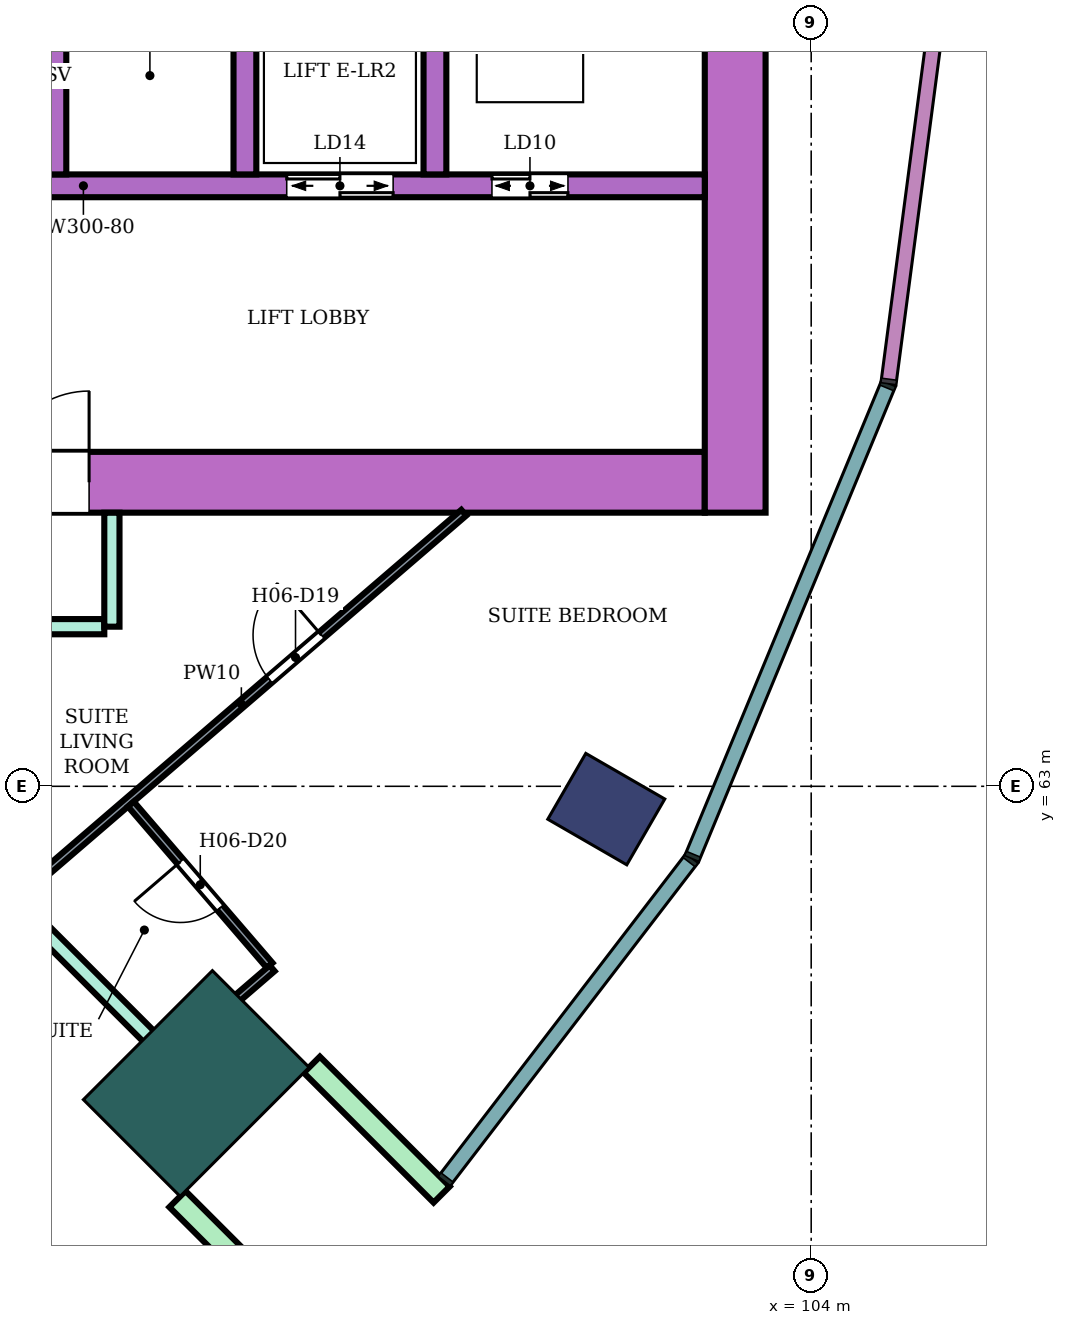
"""IFC4 building model, lengths in metres.
Left out: names, types, materials, properties, quantities, classifications, styles, units other than length and angle.
Written with IfcOpenShell. Run it as: python <this file> out.ifc"""

import sys

from ifc_helpers import new_model, si_unit, direction, frame, frame_2d, origin, origin_2d, place, context, subcontext, project, spatial, rectangle, extrude, element, fill, save


model = new_model("IFC4")
c1 = context("Model", 3, precision=1e-05, world=origin(), true_north=direction((0.0, 1.0)))
c2 = subcontext(c1, "Body", "Model", "MODEL_VIEW")
j1 = project(units=[si_unit("LENGTHUNIT", "METRE"), si_unit("PLANEANGLEUNIT", "RADIAN")], contexts=[c1])
p1 = place(None, origin())
s1 = spatial("IfcSite", under=j1, at=p1, CompositionType="ELEMENT")
p2 = place(p1, origin())
s2 = spatial("IfcBuilding", under=s1, at=p2, CompositionType="ELEMENT")
p3 = place(p2, frame((0.0, 0.0, 97.6)))
s3 = spatial("IfcBuildingStorey", under=s2, at=p3, CompositionType="ELEMENT", Elevation=97.6)
p4 = place(p3, frame((101.304, 62.7, 0.0), z_axis=(0.0, 0.0, 1.0), x_axis=(0.866025403784, -0.5, 0.0)))
e1 = element("IfcColumn", 1, at=p4, inside=s3, PredefinedType="COLUMN", context=c2, shape_type="SweptSolid", body=[
    extrude(rectangle(XDim=1.2, YDim=1.0, at=origin_2d()), origin(), (0.0, 0.0, 1.0), 3.8),
])
p5 = place(p3, frame((95.91, 59.09, 0.0), z_axis=(0.0, 0.0, 1.0), x_axis=(0.707106781187, -0.707106781187, 0.0)))
e2 = element("IfcColumn", 2, at=p5, inside=s3, PredefinedType="COLUMN", context=c2, shape_type="SweptSolid", body=[
    extrude(rectangle(XDim=1.8, YDim=2.4, at=origin_2d()), origin(), (0.0, 0.0, 1.0), 3.8),
])
p6 = place(p3, frame((87.9, 67.0, 0.0), z_axis=(0.0, 0.0, 1.0), x_axis=(1.0, 0.0, 0.0)))
e3 = element("IfcWall", 3, at=p6, inside=s3, PredefinedType="SHEAR", context=c2, shape_type="SweptSolid", body=[
    extrude(rectangle(XDim=14.7, YDim=0.8, at=frame_2d((7.35, 0.0))), origin(), (0.0, 0.0, 1.0), 3.48),
])
p7 = place(p6, frame((4.2, 0.0, 0.0)))
e4 = element("IfcOpeningElement", 4, at=p7, cuts=e3, PredefinedType="OPENING", context=c2, shape_type="SweptSolid", body=[
    extrude(rectangle(XDim=2.4, YDim=2.4, at=frame_2d((1.2, 1.2))), frame((0.0, 0.41, 0.0), z_axis=(0.0, -1.0, 0.0), x_axis=(1.0, 0.0, 0.0)), (0.0, 0.0, 1.0), 0.82),
])
p8 = place(p3, frame((103.0, 66.6, 0.0), z_axis=(0.0, 0.0, 1.0), x_axis=(0.0, 1.0, 0.0)))
e5 = element("IfcWall", 5, at=p8, inside=s3, PredefinedType="SHEAR", context=c2, shape_type="SweptSolid", body=[
    extrude(rectangle(XDim=16.8, YDim=0.8, at=frame_2d((8.4, 0.0))), origin(), (0.0, 0.0, 1.0), 3.48),
])
p9 = place(p3, frame((91.7, 70.9, 0.0), z_axis=(0.0, 0.0, 1.0), x_axis=(1.0, 0.0, 0.0)))
e6 = element("IfcWall", 6, at=p9, inside=s3, PredefinedType="SHEAR", context=c2, shape_type="SweptSolid", body=[
    extrude(rectangle(XDim=10.9, YDim=0.3, at=frame_2d((5.45, 0.0))), origin(), (0.0, 0.0, 1.0), 3.48),
])
p10 = place(p9, frame((0.4, 0.0, 0.0)))
e7 = element("IfcOpeningElement", 7, at=p10, cuts=e6, PredefinedType="OPENING", context=c2, shape_type="SweptSolid", body=[
    extrude(rectangle(XDim=1.4, YDim=2.1, at=frame_2d((0.7, 1.05))), frame((0.0, 0.16, 0.0), z_axis=(0.0, -1.0, 0.0), x_axis=(1.0, 0.0, 0.0)), (0.0, 0.0, 1.0), 0.32),
])
p11 = place(p9, frame((5.4, 0.0, 0.0)))
e8 = element("IfcOpeningElement", 8, at=p11, cuts=e6, PredefinedType="OPENING", context=c2, shape_type="SweptSolid", body=[
    extrude(rectangle(XDim=1.4, YDim=2.1, at=frame_2d((0.7, 1.05))), frame((0.0, 0.16, 0.0), z_axis=(0.0, -1.0, 0.0), x_axis=(1.0, 0.0, 0.0)), (0.0, 0.0, 1.0), 0.32),
])
p12 = place(p9, frame((8.1, 0.0, 0.0)))
e9 = element("IfcOpeningElement", 9, at=p12, cuts=e6, PredefinedType="OPENING", context=c2, shape_type="SweptSolid", body=[
    extrude(rectangle(XDim=1.0, YDim=2.1, at=frame_2d((0.5, 1.05))), frame((0.0, 0.16, 0.0), z_axis=(0.0, -1.0, 0.0), x_axis=(1.0, 0.0, 0.0)), (0.0, 0.0, 1.0), 0.32),
])
for number, where, z_axis, x_axis in (
    (10, (94.05, 71.05, 0.0), (0.0, 0.0, 1.0), (0.0, 1.0, 0.0)),
    (11, (96.55, 71.05, 0.0), (0.0, 0.0, 1.0), (0.0, 1.0, 0.0)),
    (12, (99.05, 71.05, 0.0), (0.0, 0.0, 1.0), (0.0, 1.0, 0.0)),
):
    element("IfcWall", number, at=place(p3, frame(where, z_axis=z_axis, x_axis=x_axis)), inside=s3, PredefinedType="SHEAR", context=c2, shape_type="SweptSolid", body=[
        extrude(rectangle(XDim=2.55, YDim=0.3, at=frame_2d((1.275, 0.0))), origin(), (0.0, 0.0, 1.0), 3.48),
    ])
for number, where, z_axis, x_axis in (
    (13, (95.662, 57.57, 0.0), (0.0, 0.0, 1.0), (0.707, -0.707, 0.0)),
    (14, (97.43, 59.338, 0.0), (0.0, 0.0, 1.0), (0.707, -0.707, 0.0)),
):
    element("IfcWall", number, at=place(p3, frame(where, z_axis=z_axis, x_axis=x_axis)), inside=s3, PredefinedType="NOTDEFINED", context=c2, shape_type="SweptSolid", body=[
        extrude(rectangle(XDim=2.416, YDim=0.3, at=frame_2d((1.208, 0.0))), origin(), (0.0, 0.0, 1.0), 3.8),
    ])
p13 = place(p3, frame((91.448, 63.547, 0.0), z_axis=(0.0, 0.0, 1.0), x_axis=(0.706949958062, -0.707263569538, 0.0)))
e15 = element("IfcWall", 15, at=p13, inside=s3, PredefinedType="PARTITIONING", context=c2, shape_type="SweptSolid", body=[
    extrude(rectangle(XDim=7.006, YDim=0.2, at=frame_2d((3.503, 0.0))), origin(), (0.0, 0.0, 1.0), 3.35),
])
p14 = place(p3, frame((93.085, 65.1, 0.0), z_axis=(0.0, 0.0, 1.0), x_axis=(1.0, 0.0, 0.0)))
e16 = element("IfcWall", 16, at=p14, inside=s3, PredefinedType="PARTITIONING", context=c2, shape_type="SweptSolid", body=[
    extrude(rectangle(XDim=1.615, YDim=0.2, at=frame_2d((0.808, 0.0))), origin(), (0.0, 0.0, 1.0), 3.35),
])
p15 = place(p3, frame((94.8, 65.1, 0.0), z_axis=(0.0, 0.0, 1.0), x_axis=(0.0, 1.0, 0.0)))
e17 = element("IfcWall", 17, at=p15, inside=s3, PredefinedType="PARTITIONING", context=c2, shape_type="SweptSolid", body=[
    extrude(rectangle(XDim=1.499, YDim=0.2, at=frame_2d((0.75, 0.0))), origin(), (0.0, 0.0, 1.0), 3.35),
])
p16 = place(p3, frame((93.577, 61.565, 0.0), z_axis=(0.0, 0.0, 1.0), x_axis=(0.75812140399, 0.652113438607, 0.0)))
e18 = element("IfcWall", 18, at=p16, inside=s3, PredefinedType="PARTITIONING", context=c2, shape_type="SweptSolid", body=[
    extrude(rectangle(XDim=7.72, YDim=0.1, at=frame_2d((3.86, 0.0))), origin(), (0.0, 0.0, 1.0), 3.35),
])
p17 = place(p16, frame((4.35, 0.0, 0.0)))
e19 = element("IfcOpeningElement", 19, at=p17, cuts=e18, PredefinedType="OPENING", context=c2, shape_type="SweptSolid", body=[
    extrude(rectangle(XDim=0.9, YDim=2.1, at=frame_2d((0.45, 1.05))), frame((0.0, 0.06, 0.0), z_axis=(0.0, -1.0, 0.0), x_axis=(1.0, 0.0, 0.0)), (0.0, 0.0, 1.0), 0.12),
])
p18 = place(p3, frame((95.05, 62.766, 0.0), z_axis=(0.0, 0.0, 1.0), x_axis=(0.652190642827, -0.75805498838, 0.0)))
e20 = element("IfcWall", 20, at=p18, inside=s3, PredefinedType="PARTITIONING", context=c2, shape_type="SweptSolid", body=[
    extrude(rectangle(XDim=2.8, YDim=0.1, at=frame_2d((1.4, 0.0))), origin(), (0.0, 0.0, 1.0), 3.35),
])
p19 = place(p18, frame((1.0, 0.0, 0.0)))
e21 = element("IfcOpeningElement", 21, at=p19, cuts=e20, PredefinedType="OPENING", context=c2, shape_type="SweptSolid", body=[
    extrude(rectangle(XDim=0.8, YDim=2.1, at=frame_2d((0.4, 1.05))), frame((0.0, 0.06, 0.0), z_axis=(0.0, -1.0, 0.0), x_axis=(1.0, 0.0, 0.0)), (0.0, 0.0, 1.0), 0.12),
])
p20 = place(p3, frame((95.634, 59.509, 0.0), z_axis=(0.0, 0.0, 1.0), x_axis=(0.757922369717, 0.652344756614, 0.0)))
e22 = element("IfcWall", 22, at=p20, inside=s3, PredefinedType="PARTITIONING", context=c2, shape_type="SweptSolid", body=[
    extrude(rectangle(XDim=1.681, YDim=0.1, at=frame_2d((0.841, 0.0))), origin(), (0.0, 0.0, 1.0), 3.35),
])
p21 = place(p17, origin())
e23 = element("IfcDoor", 23, at=p21, inside=s3, OperationType="SINGLE_SWING_RIGHT", PredefinedType="DOOR", context=c2, shape_type="SweptSolid", body=[
    extrude(rectangle(XDim=0.9, YDim=2.1, at=frame_2d((0.45, 1.05))), frame((0.0, 0.025, 0.0), z_axis=(0.0, -1.0, 0.0), x_axis=(1.0, 0.0, 0.0)), (0.0, 0.0, 1.0), 0.05),
])
fill(e19, e23)
p22 = place(p19, frame((0.8, 0.0, 0.0), z_axis=(0.0, 0.0, 1.0), x_axis=(-1.0, 0.0, 0.0)))
e24 = element("IfcDoor", 24, at=p22, inside=s3, OperationType="SINGLE_SWING_RIGHT", PredefinedType="DOOR", context=c2, shape_type="SweptSolid", body=[
    extrude(rectangle(XDim=0.8, YDim=2.1, at=frame_2d((0.4, 1.05))), frame((0.0, 0.025, 0.0), z_axis=(0.0, -1.0, 0.0), x_axis=(1.0, 0.0, 0.0)), (0.0, 0.0, 1.0), 0.05),
])
fill(e21, e24)
p23 = place(p11, origin())
e25 = element("IfcDoor", 25, at=p23, inside=s3, OperationType="DOUBLE_DOOR_SLIDING", PredefinedType="DOOR", context=c2, shape_type="SweptSolid", body=[
    extrude(rectangle(XDim=1.4, YDim=2.1, at=frame_2d((0.7, 1.05))), frame((0.0, 0.025, 0.0), z_axis=(0.0, -1.0, 0.0), x_axis=(1.0, 0.0, 0.0)), (0.0, 0.0, 1.0), 0.05),
])
fill(e8, e25)
p24 = place(p12, origin())
e26 = element("IfcDoor", 26, at=p24, inside=s3, OperationType="DOUBLE_DOOR_SLIDING", PredefinedType="DOOR", context=c2, shape_type="SweptSolid", body=[
    extrude(rectangle(XDim=1.0, YDim=2.1, at=frame_2d((0.5, 1.05))), frame((0.0, 0.025, 0.0), z_axis=(0.0, -1.0, 0.0), x_axis=(1.0, 0.0, 0.0)), (0.0, 0.0, 1.0), 0.05),
])
fill(e9, e26)
p25 = place(p7, origin())
e27 = element("IfcDoor", 27, at=p25, inside=s3, OperationType="DOUBLE_DOOR_SINGLE_SWING", PredefinedType="DOOR", context=c2, shape_type="SweptSolid", body=[
    extrude(rectangle(XDim=2.4, YDim=2.4, at=frame_2d((1.2, 1.2))), frame((0.0, 0.025, 0.0), z_axis=(0.0, -1.0, 0.0), x_axis=(1.0, 0.0, 0.0)), (0.0, 0.0, 1.0), 0.05),
])
fill(e4, e27)
save(model, sys.argv[1])
